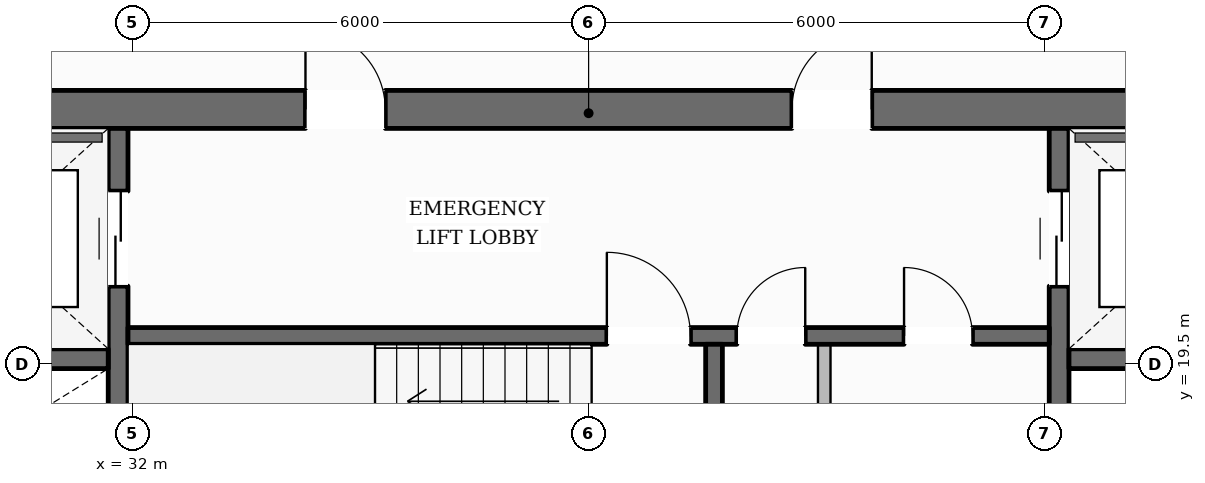
"""IFC4 building model, lengths in metres.
Left out: names, types, materials, properties, quantities, classifications, styles, units other than length and angle.
Written with IfcOpenShell. Run it as: python <this file> out.ifc"""

import sys

from ifc_helpers import new_model, si_unit, direction, frame, frame_2d, origin, place, context, subcontext, project, spatial, rectangle, extrude, element, fill, save


model = new_model("IFC4")
c1 = context("Model", 3, precision=1e-05, world=origin(), true_north=direction((0.0, 1.0)))
c2 = subcontext(c1, "Body", "Model", "MODEL_VIEW")
j1 = project(units=[si_unit("LENGTHUNIT", "METRE"), si_unit("PLANEANGLEUNIT", "RADIAN")], contexts=[c1])
p1 = place(None, origin())
s1 = spatial("IfcSite", under=j1, at=p1, CompositionType="ELEMENT")
p2 = place(p1, origin())
s2 = spatial("IfcBuilding", under=s1, at=p2, CompositionType="ELEMENT")
p3 = place(p2, frame((0.0, 0.0, 150.95)))
s3 = spatial("IfcBuildingStorey", under=s2, at=p3, CompositionType="ELEMENT", Elevation=150.95)
p4 = place(p3, frame((27.98, 22.85, 0.0), z_axis=(0.0, 0.0, 1.0), x_axis=(1.0, 0.0, 0.0)))
e1 = element("IfcWall", 1, at=p4, inside=s3, PredefinedType="SOLIDWALL", context=c2, shape_type="SweptSolid", body=[
    extrude(rectangle(XDim=20.04, YDim=0.5, at=frame_2d((10.02, 0.0))), origin(), (0.0, 0.0, 1.0), 3.43),
])
p5 = place(p4, frame((6.295, 0.0, 0.0)))
e2 = element("IfcOpeningElement", 2, at=p5, cuts=e1, PredefinedType="OPENING", context=c2, shape_type="SweptSolid", body=[
    extrude(rectangle(XDim=1.05, YDim=2.15, at=frame_2d((0.525, 1.075))), frame((0.0, 0.26, 0.0), z_axis=(0.0, -1.0, 0.0), x_axis=(1.0, 0.0, 0.0)), (0.0, 0.0, 1.0), 0.52),
])
p6 = place(p4, frame((12.695, 0.0, 0.0)))
e3 = element("IfcOpeningElement", 3, at=p6, cuts=e1, PredefinedType="OPENING", context=c2, shape_type="SweptSolid", body=[
    extrude(rectangle(XDim=1.05, YDim=2.15, at=frame_2d((0.525, 1.075))), frame((0.0, 0.26, 0.0), z_axis=(0.0, -1.0, 0.0), x_axis=(1.0, 0.0, 0.0)), (0.0, 0.0, 1.0), 0.52),
])
p7 = place(p3, frame((31.81, 9.6, 0.0), z_axis=(0.0, 0.0, 1.0), x_axis=(0.0, 1.0, 0.0)))
e4 = element("IfcWall", 4, at=p7, inside=s3, PredefinedType="SHEAR", context=c2, shape_type="SweptSolid", body=[
    extrude(rectangle(XDim=13.0, YDim=0.26, at=frame_2d((6.5, 0.0))), origin(), (0.0, 0.0, 1.0), 3.43),
])
p8 = place(p7, frame((10.925, 0.0, 0.0)))
e5 = element("IfcOpeningElement", 5, at=p8, cuts=e4, PredefinedType="OPENING", context=c2, shape_type="SweptSolid", body=[
    extrude(rectangle(XDim=1.25, YDim=2.25, at=frame_2d((0.625, 1.125))), frame((0.0, 0.14, 0.0), z_axis=(0.0, -1.0, 0.0), x_axis=(1.0, 0.0, 0.0)), (0.0, 0.0, 1.0), 0.28),
])
p9 = place(p3, frame((44.19, 9.6, 0.0), z_axis=(0.0, 0.0, 1.0), x_axis=(0.0, 1.0, 0.0)))
e6 = element("IfcWall", 6, at=p9, inside=s3, PredefinedType="SHEAR", context=c2, shape_type="SweptSolid", body=[
    extrude(rectangle(XDim=13.0, YDim=0.26, at=frame_2d((6.5, 0.0))), origin(), (0.0, 0.0, 1.0), 3.43),
])
p10 = place(p9, frame((10.925, 0.0, 0.0)))
e7 = element("IfcOpeningElement", 7, at=p10, cuts=e6, PredefinedType="OPENING", context=c2, shape_type="SweptSolid", body=[
    extrude(rectangle(XDim=1.25, YDim=2.25, at=frame_2d((0.625, 1.125))), frame((0.0, 0.14, 0.0), z_axis=(0.0, -1.0, 0.0), x_axis=(1.0, 0.0, 0.0)), (0.0, 0.0, 1.0), 0.28),
])
for number, where, z_axis, x_axis in (
    (8, (28.48, 19.57, 0.0), (0.0, 0.0, 1.0), (1.0, 0.0, 0.0)),
    (9, (44.32, 19.57, 0.0), (0.0, 0.0, 1.0), (1.0, 0.0, 0.0)),
):
    element("IfcWall", number, at=place(p3, frame(where, z_axis=z_axis, x_axis=x_axis)), inside=s3, PredefinedType="SHEAR", context=c2, shape_type="SweptSolid", body=[
        extrude(rectangle(XDim=3.2, YDim=0.26, at=frame_2d((1.6, 0.0))), origin(), (0.0, 0.0, 1.0), 3.43),
    ])
p11 = place(p3, frame((31.94, 19.87, 0.0), z_axis=(0.0, 0.0, 1.0), x_axis=(1.0, 0.0, 0.0)))
e10 = element("IfcWall", 10, at=p11, inside=s3, PredefinedType="SOLIDWALL", context=c2, shape_type="SweptSolid", body=[
    extrude(rectangle(XDim=12.12, YDim=0.22, at=frame_2d((6.06, 0.0))), origin(), (0.0, 0.0, 1.0), 3.43),
])
p12 = place(p11, frame((6.3, 0.0, 0.0)))
e11 = element("IfcOpeningElement", 11, at=p12, cuts=e10, PredefinedType="OPENING", context=c2, shape_type="SweptSolid", body=[
    extrude(rectangle(XDim=1.1, YDim=2.15, at=frame_2d((0.55, 1.075))), frame((0.0, 0.12, 0.0), z_axis=(0.0, -1.0, 0.0), x_axis=(1.0, 0.0, 0.0)), (0.0, 0.0, 1.0), 0.24),
])
p13 = place(p11, frame((8.01, 0.0, 0.0)))
e12 = element("IfcOpeningElement", 12, at=p13, cuts=e10, PredefinedType="OPENING", context=c2, shape_type="SweptSolid", body=[
    extrude(rectangle(XDim=0.9, YDim=2.1, at=frame_2d((0.45, 1.05))), frame((0.0, 0.12, 0.0), z_axis=(0.0, -1.0, 0.0), x_axis=(1.0, 0.0, 0.0)), (0.0, 0.0, 1.0), 0.24),
])
p14 = place(p11, frame((10.21, 0.0, 0.0)))
e13 = element("IfcOpeningElement", 13, at=p14, cuts=e10, PredefinedType="OPENING", context=c2, shape_type="SweptSolid", body=[
    extrude(rectangle(XDim=0.9, YDim=2.1, at=frame_2d((0.45, 1.05))), frame((0.0, 0.12, 0.0), z_axis=(0.0, -1.0, 0.0), x_axis=(1.0, 0.0, 0.0)), (0.0, 0.0, 1.0), 0.24),
])
p15 = place(p3, frame((39.65, 16.56, 0.0), z_axis=(0.0, 0.0, 1.0), x_axis=(0.0, 1.0, 0.0)))
e14 = element("IfcWall", 14, at=p15, inside=s3, PredefinedType="SOLIDWALL", context=c2, shape_type="SweptSolid", body=[
    extrude(rectangle(XDim=3.2, YDim=0.22, at=frame_2d((1.6, 0.0))), origin(), (0.0, 0.0, 1.0), 3.43),
])
p16 = place(p3, frame((13.327, 11.879, 0.0), z_axis=(0.0, 0.0, 1.0), x_axis=(0.500913687278, 0.865497243148, 0.0)))
e15 = element("IfcWall", 15, at=p16, inside=s3, PredefinedType="STANDARD", context=c2, shape_type="SweptSolid", body=[
    extrude(rectangle(XDim=38.628, YDim=0.38, at=frame_2d((19.314, 0.0))), origin(), (0.0, 0.0, 1.0), 2.889),
])
p17 = place(p16, frame((9.257, 0.0, 0.0)))
e16 = element("IfcOpeningElement", 16, at=p17, cuts=e15, PredefinedType="OPENING", context=c2, shape_type="SweptSolid", body=[
    extrude(rectangle(XDim=1.0, YDim=2.2, at=frame_2d((0.5, 1.1))), frame((0.0, 0.2, 0.0), z_axis=(0.0, -1.0, 0.0), x_axis=(1.0, 0.0, 0.0)), (0.0, 0.0, 1.0), 0.4),
])
p18 = place(p16, frame((34.239, 0.0, 0.55)))
e17 = element("IfcOpeningElement", 17, at=p18, cuts=e15, PredefinedType="OPENING", context=c2, shape_type="SweptSolid", body=[
    extrude(rectangle(XDim=1.55, YDim=1.6, at=frame_2d((0.775, 0.8))), frame((0.0, 0.2, 0.0), z_axis=(0.0, -1.0, 0.0), x_axis=(1.0, 0.0, 0.0)), (0.0, 0.0, 1.0), 0.4),
])
p19 = place(p16, frame((27.959, 0.0, 0.55)))
e18 = element("IfcOpeningElement", 18, at=p19, cuts=e15, PredefinedType="OPENING", context=c2, shape_type="SweptSolid", body=[
    extrude(rectangle(XDim=1.55, YDim=1.6, at=frame_2d((0.775, 0.8))), frame((0.0, 0.2, 0.0), z_axis=(0.0, -1.0, 0.0), x_axis=(1.0, 0.0, 0.0)), (0.0, 0.0, 1.0), 0.4),
])
p20 = place(p16, frame((21.679, 0.0, 0.55)))
e19 = element("IfcOpeningElement", 19, at=p20, cuts=e15, PredefinedType="OPENING", context=c2, shape_type="SweptSolid", body=[
    extrude(rectangle(XDim=1.55, YDim=1.6, at=frame_2d((0.775, 0.8))), frame((0.0, 0.2, 0.0), z_axis=(0.0, -1.0, 0.0), x_axis=(1.0, 0.0, 0.0)), (0.0, 0.0, 1.0), 0.4),
])
p21 = place(p16, frame((2.84, 0.0, 0.55)))
e20 = element("IfcOpeningElement", 20, at=p21, cuts=e15, PredefinedType="OPENING", context=c2, shape_type="SweptSolid", body=[
    extrude(rectangle(XDim=1.55, YDim=1.6, at=frame_2d((0.775, 0.8))), frame((0.0, 0.2, 0.0), z_axis=(0.0, -1.0, 0.0), x_axis=(1.0, 0.0, 0.0)), (0.0, 0.0, 1.0), 0.4),
])
p22 = place(p3, frame((43.179, 45.396, 0.0), z_axis=(0.0, 0.0, 1.0), x_axis=(0.494363218784, -0.869255433065, 0.0)))
e21 = element("IfcWall", 21, at=p22, inside=s3, PredefinedType="STANDARD", context=c2, shape_type="SweptSolid", body=[
    extrude(rectangle(XDim=38.134, YDim=0.38, at=frame_2d((19.067, 0.0))), origin(), (0.0, 0.0, 1.0), 2.889),
])
p23 = place(p22, frame((9.134, 0.0, 0.0)))
e22 = element("IfcOpeningElement", 22, at=p23, cuts=e21, PredefinedType="OPENING", context=c2, shape_type="SweptSolid", body=[
    extrude(rectangle(XDim=1.0, YDim=2.2, at=frame_2d((0.5, 1.1))), frame((0.0, 0.2, 0.0), z_axis=(0.0, -1.0, 0.0), x_axis=(1.0, 0.0, 0.0)), (0.0, 0.0, 1.0), 0.4),
])
p24 = place(p22, frame((33.785, 0.0, 0.55)))
e23 = element("IfcOpeningElement", 23, at=p24, cuts=e21, PredefinedType="OPENING", context=c2, shape_type="SweptSolid", body=[
    extrude(rectangle(XDim=1.55, YDim=1.6, at=frame_2d((0.775, 0.8))), frame((0.0, 0.2, 0.0), z_axis=(0.0, -1.0, 0.0), x_axis=(1.0, 0.0, 0.0)), (0.0, 0.0, 1.0), 0.4),
])
p25 = place(p22, frame((27.589, 0.0, 0.55)))
e24 = element("IfcOpeningElement", 24, at=p25, cuts=e21, PredefinedType="OPENING", context=c2, shape_type="SweptSolid", body=[
    extrude(rectangle(XDim=1.55, YDim=1.6, at=frame_2d((0.775, 0.8))), frame((0.0, 0.2, 0.0), z_axis=(0.0, -1.0, 0.0), x_axis=(1.0, 0.0, 0.0)), (0.0, 0.0, 1.0), 0.4),
])
p26 = place(p22, frame((21.393, 0.0, 0.55)))
e25 = element("IfcOpeningElement", 25, at=p26, cuts=e21, PredefinedType="OPENING", context=c2, shape_type="SweptSolid", body=[
    extrude(rectangle(XDim=1.55, YDim=1.6, at=frame_2d((0.775, 0.8))), frame((0.0, 0.2, 0.0), z_axis=(0.0, -1.0, 0.0), x_axis=(1.0, 0.0, 0.0)), (0.0, 0.0, 1.0), 0.4),
])
p27 = place(p22, frame((2.805, 0.0, 0.55)))
e26 = element("IfcOpeningElement", 26, at=p27, cuts=e21, PredefinedType="OPENING", context=c2, shape_type="SweptSolid", body=[
    extrude(rectangle(XDim=1.55, YDim=1.6, at=frame_2d((0.775, 0.8))), frame((0.0, 0.2, 0.0), z_axis=(0.0, -1.0, 0.0), x_axis=(1.0, 0.0, 0.0)), (0.0, 0.0, 1.0), 0.4),
])
p28 = place(p3, frame((41.1, 16.56, 0.0), z_axis=(0.0, 0.0, 1.0), x_axis=(0.0, 1.0, 0.0)))
e27 = element("IfcWall", 27, at=p28, inside=s3, PredefinedType="PARTITIONING", context=c2, shape_type="SweptSolid", body=[
    extrude(rectangle(XDim=3.2, YDim=0.165, at=frame_2d((1.6, 0.0))), origin(), (0.0, 0.0, 1.0), 3.43),
])
p29 = place(p12, origin())
e28 = element("IfcDoor", 28, at=p29, inside=s3, OperationType="SINGLE_SWING_LEFT", PredefinedType="DOOR", context=c2, shape_type="SweptSolid", body=[
    extrude(rectangle(XDim=1.1, YDim=2.15, at=frame_2d((0.55, 1.075))), frame((0.0, 0.025, 0.0), z_axis=(0.0, -1.0, 0.0), x_axis=(1.0, 0.0, 0.0)), (0.0, 0.0, 1.0), 0.05),
])
fill(e11, e28)
p30 = place(p5, origin())
e29 = element("IfcDoor", 29, at=p30, inside=s3, OperationType="SINGLE_SWING_LEFT", PredefinedType="DOOR", context=c2, shape_type="SweptSolid", body=[
    extrude(rectangle(XDim=1.05, YDim=2.15, at=frame_2d((0.525, 1.075))), frame((0.0, 0.025, 0.0), z_axis=(0.0, -1.0, 0.0), x_axis=(1.0, 0.0, 0.0)), (0.0, 0.0, 1.0), 0.05),
])
fill(e2, e29)
p31 = place(p6, origin())
e30 = element("IfcDoor", 30, at=p31, inside=s3, OperationType="SINGLE_SWING_RIGHT", PredefinedType="DOOR", context=c2, shape_type="SweptSolid", body=[
    extrude(rectangle(XDim=1.05, YDim=2.15, at=frame_2d((0.525, 1.075))), frame((0.0, 0.025, 0.0), z_axis=(0.0, -1.0, 0.0), x_axis=(1.0, 0.0, 0.0)), (0.0, 0.0, 1.0), 0.05),
])
fill(e3, e30)
p32 = place(p8, origin())
e31 = element("IfcDoor", 31, at=p32, inside=s3, OperationType="DOUBLE_DOOR_SLIDING", PredefinedType="DOOR", context=c2, shape_type="SweptSolid", body=[
    extrude(rectangle(XDim=1.25, YDim=2.25, at=frame_2d((0.625, 1.125))), frame((0.0, 0.025, 0.0), z_axis=(0.0, -1.0, 0.0), x_axis=(1.0, 0.0, 0.0)), (0.0, 0.0, 1.0), 0.05),
])
fill(e5, e31)
p33 = place(p10, origin())
e32 = element("IfcDoor", 32, at=p33, inside=s3, OperationType="DOUBLE_DOOR_SLIDING", PredefinedType="DOOR", context=c2, shape_type="SweptSolid", body=[
    extrude(rectangle(XDim=1.25, YDim=2.25, at=frame_2d((0.625, 1.125))), frame((0.0, 0.025, 0.0), z_axis=(0.0, -1.0, 0.0), x_axis=(1.0, 0.0, 0.0)), (0.0, 0.0, 1.0), 0.05),
])
fill(e7, e32)
p34 = place(p13, origin())
e33 = element("IfcDoor", 33, at=p34, inside=s3, OperationType="SINGLE_SWING_RIGHT", PredefinedType="DOOR", context=c2, shape_type="SweptSolid", body=[
    extrude(rectangle(XDim=0.9, YDim=2.1, at=frame_2d((0.45, 1.05))), frame((0.0, 0.025, 0.0), z_axis=(0.0, -1.0, 0.0), x_axis=(1.0, 0.0, 0.0)), (0.0, 0.0, 1.0), 0.05),
])
fill(e12, e33)
p35 = place(p14, origin())
e34 = element("IfcDoor", 34, at=p35, inside=s3, OperationType="SINGLE_SWING_LEFT", PredefinedType="DOOR", context=c2, shape_type="SweptSolid", body=[
    extrude(rectangle(XDim=0.9, YDim=2.1, at=frame_2d((0.45, 1.05))), frame((0.0, 0.025, 0.0), z_axis=(0.0, -1.0, 0.0), x_axis=(1.0, 0.0, 0.0)), (0.0, 0.0, 1.0), 0.05),
])
fill(e13, e34)
save(model, sys.argv[1])
